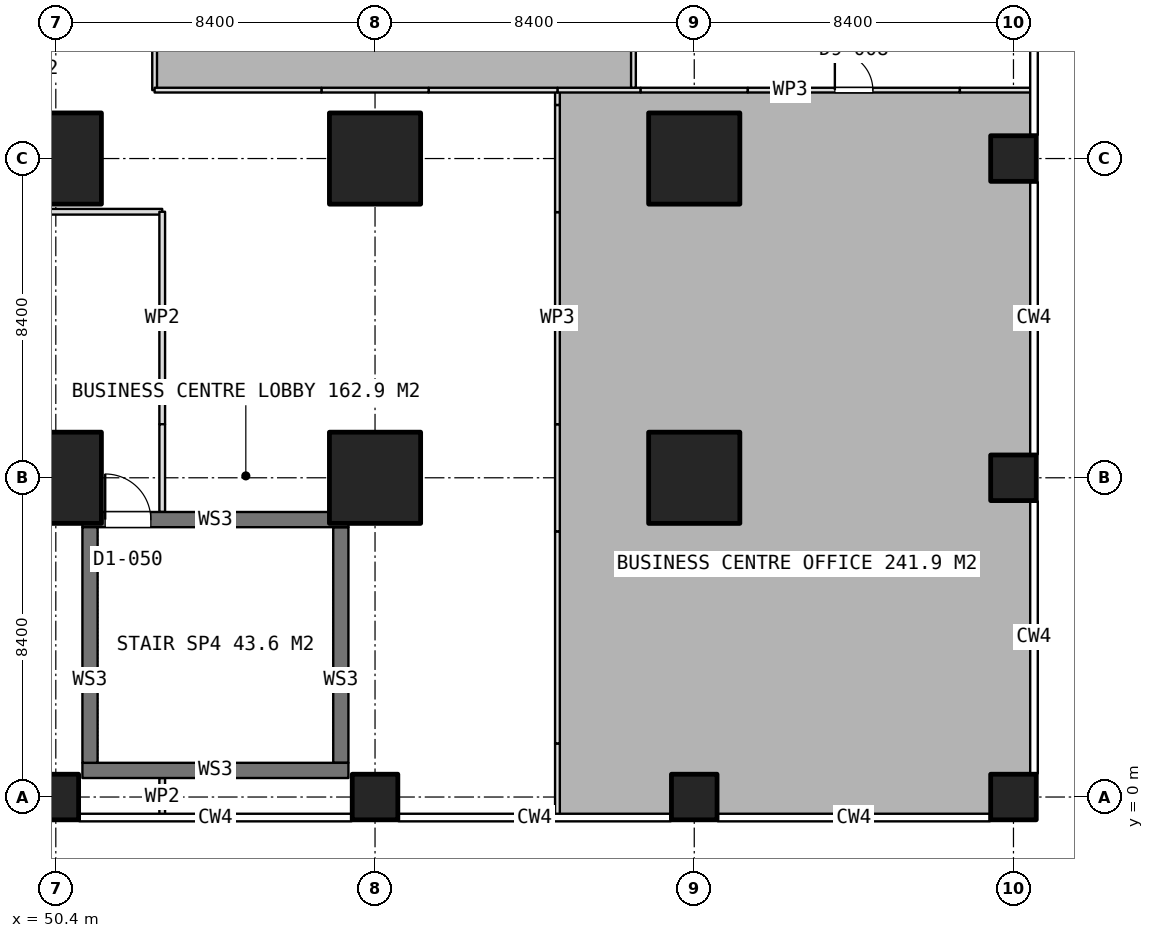
"""IFC4 building model, lengths in metres.
Left out: names, types, materials, properties, quantities, classifications, styles, units other than length and angle.
Written with IfcOpenShell. Run it as: python <this file> out.ifc"""

import sys

from ifc_helpers import new_model, si_unit, direction, frame, frame_2d, origin, origin_2d, place, context, subcontext, project, spatial, rectangle, extrude, element, fill, save


model = new_model("IFC4")
c1 = context("Model", 3, precision=1e-05, world=origin(), true_north=direction((0.0, 1.0)))
c2 = subcontext(c1, "Body", "Model", "MODEL_VIEW")
j1 = project(units=[si_unit("LENGTHUNIT", "METRE"), si_unit("PLANEANGLEUNIT", "RADIAN")], contexts=[c1])
p1 = place(None, origin())
s1 = spatial("IfcSite", under=j1, at=p1, CompositionType="ELEMENT")
p2 = place(p1, origin())
s2 = spatial("IfcBuilding", under=s1, at=p2, CompositionType="ELEMENT")
p3 = place(p2, frame((0.0, 0.0, 20.4)))
s3 = spatial("IfcBuildingStorey", under=s2, at=p3, CompositionType="ELEMENT", Elevation=20.4)
p4 = place(p3, frame((50.4, 0.0, 0.0), z_axis=(0.0, 0.0, 1.0), x_axis=(1.0, 0.0, 0.0)))
e1 = element("IfcColumn", 1, at=p4, inside=s3, PredefinedType="COLUMN", context=c2, shape_type="SweptSolid", body=[
    extrude(rectangle(XDim=1.2, YDim=1.2, at=origin_2d()), origin(), (0.0, 0.0, 1.0), 5.0),
])
for number, where, z_axis, x_axis in (
    (2, (50.4, 8.4, 0.0), (0.0, 0.0, 1.0), (1.0, 0.0, 0.0)),
    (3, (50.4, 16.8, 0.0), (0.0, 0.0, 1.0), (1.0, 0.0, 0.0)),
):
    element("IfcColumn", number, at=place(p3, frame(where, z_axis=z_axis, x_axis=x_axis)), inside=s3, PredefinedType="COLUMN", context=c2, shape_type="SweptSolid", body=[
        extrude(rectangle(XDim=2.4, YDim=2.4, at=origin_2d()), origin(), (0.0, 0.0, 1.0), 5.0),
    ])
p5 = place(p3, frame((58.8, 0.0, 0.0), z_axis=(0.0, 0.0, 1.0), x_axis=(1.0, 0.0, 0.0)))
e4 = element("IfcColumn", 4, at=p5, inside=s3, PredefinedType="COLUMN", context=c2, shape_type="SweptSolid", body=[
    extrude(rectangle(XDim=1.2, YDim=1.2, at=origin_2d()), origin(), (0.0, 0.0, 1.0), 5.0),
])
for number, where, z_axis, x_axis in (
    (5, (58.8, 8.4, 0.0), (0.0, 0.0, 1.0), (1.0, 0.0, 0.0)),
    (6, (58.8, 16.8, 0.0), (0.0, 0.0, 1.0), (1.0, 0.0, 0.0)),
):
    element("IfcColumn", number, at=place(p3, frame(where, z_axis=z_axis, x_axis=x_axis)), inside=s3, PredefinedType="COLUMN", context=c2, shape_type="SweptSolid", body=[
        extrude(rectangle(XDim=2.4, YDim=2.4, at=origin_2d()), origin(), (0.0, 0.0, 1.0), 5.0),
    ])
p6 = place(p3, frame((67.2, 0.0, 0.0), z_axis=(0.0, 0.0, 1.0), x_axis=(1.0, 0.0, 0.0)))
e7 = element("IfcColumn", 7, at=p6, inside=s3, PredefinedType="COLUMN", context=c2, shape_type="SweptSolid", body=[
    extrude(rectangle(XDim=1.2, YDim=1.2, at=origin_2d()), origin(), (0.0, 0.0, 1.0), 5.0),
])
for number, where, z_axis, x_axis in (
    (8, (67.2, 8.4, 0.0), (0.0, 0.0, 1.0), (1.0, 0.0, 0.0)),
    (9, (67.2, 16.8, 0.0), (0.0, 0.0, 1.0), (1.0, 0.0, 0.0)),
):
    element("IfcColumn", number, at=place(p3, frame(where, z_axis=z_axis, x_axis=x_axis)), inside=s3, PredefinedType="COLUMN", context=c2, shape_type="SweptSolid", body=[
        extrude(rectangle(XDim=2.4, YDim=2.4, at=origin_2d()), origin(), (0.0, 0.0, 1.0), 5.0),
    ])
for number, where, z_axis, x_axis in (
    (10, (75.6, 0.0, 0.0), (0.0, 0.0, 1.0), (1.0, 0.0, 0.0)),
    (11, (75.6, 8.4, 0.0), (0.0, 0.0, 1.0), (1.0, 0.0, 0.0)),
    (12, (75.6, 16.8, 0.0), (0.0, 0.0, 1.0), (1.0, 0.0, 0.0)),
):
    element("IfcColumn", number, at=place(p3, frame(where, z_axis=z_axis, x_axis=x_axis)), inside=s3, PredefinedType="COLUMN", context=c2, shape_type="SweptSolid", body=[
        extrude(rectangle(XDim=1.2, YDim=1.2, at=origin_2d()), origin(), (0.0, 0.0, 1.0), 5.0),
    ])
p7 = place(p3, frame((51.1, 0.7, 0.0), z_axis=(0.0, 0.0, 1.0), x_axis=(1.0, 0.0, 0.0)))
e13 = element("IfcWall", 13, at=p7, inside=s3, PredefinedType="SOLIDWALL", context=c2, shape_type="SweptSolid", body=[
    extrude(rectangle(XDim=7.0, YDim=0.4, at=frame_2d((3.5, 0.0))), origin(), (0.0, 0.0, 1.0), 2.8),
])
p8 = place(p3, frame((51.1, 7.3, 0.0), z_axis=(0.0, 0.0, 1.0), x_axis=(1.0, 0.0, 0.0)))
e14 = element("IfcWall", 14, at=p8, inside=s3, PredefinedType="SOLIDWALL", context=c2, shape_type="SweptSolid", body=[
    extrude(rectangle(XDim=7.0, YDim=0.4, at=frame_2d((3.5, 0.0))), origin(), (0.0, 0.0, 1.0), 2.8),
])
p9 = place(p8, frame((0.6, 0.0, 0.0)))
e15 = element("IfcOpeningElement", 15, at=p9, cuts=e14, PredefinedType="OPENING", context=c2, shape_type="SweptSolid", body=[
    extrude(rectangle(XDim=1.2, YDim=2.1, at=frame_2d((0.6, 1.05))), frame((0.0, 0.21, 0.0), z_axis=(0.0, -1.0, 0.0), x_axis=(1.0, 0.0, 0.0)), (0.0, 0.0, 1.0), 0.42),
])
for number, where, z_axis, x_axis in (
    (16, (51.3, 0.9, 0.0), (0.0, 0.0, 1.0), (0.0, 1.0, 0.0)),
    (17, (57.9, 0.9, 0.0), (0.0, 0.0, 1.0), (0.0, 1.0, 0.0)),
):
    element("IfcWall", number, at=place(p3, frame(where, z_axis=z_axis, x_axis=x_axis)), inside=s3, PredefinedType="SOLIDWALL", context=c2, shape_type="SweptSolid", body=[
        extrude(rectangle(XDim=6.2, YDim=0.4, at=frame_2d((3.1, 0.0))), origin(), (0.0, 0.0, 1.0), 2.8),
    ])
p10 = place(p3, frame((22.4, 15.4, 0.0), z_axis=(0.0, 0.0, 1.0), x_axis=(1.0, 0.0, 0.0)))
e18 = element("IfcWall", 18, at=p10, inside=s3, PredefinedType="PARTITIONING", context=c2, shape_type="SweptSolid", body=[
    extrude(rectangle(XDim=30.8, YDim=0.15, at=frame_2d((15.4, 0.0))), origin(), (0.0, 0.0, 1.0), 2.8),
])
p11 = place(p3, frame((53.2, 15.4, 0.0), z_axis=(0.0, 0.0, 1.0), x_axis=(0.0, -1.0, 0.0)))
e19 = element("IfcWall", 19, at=p11, inside=s3, PredefinedType="PARTITIONING", context=c2, shape_type="SweptSolid", body=[
    extrude(rectangle(XDim=5.59, YDim=0.15, at=frame_2d((2.795, 0.0))), origin(), (0.0, 0.0, 1.0), 2.8),
])
p12 = place(p3, frame((53.2, 9.81, 0.0), z_axis=(0.0, 0.0, 1.0), x_axis=(0.0, -1.0, 0.0)))
e20 = element("IfcWall", 20, at=p12, inside=s3, PredefinedType="PARTITIONING", context=c2, shape_type="SweptSolid", body=[
    extrude(rectangle(XDim=2.31, YDim=0.15, at=frame_2d((1.155, 0.0))), origin(), (0.0, 0.0, 1.0), 2.8),
])
p13 = place(p3, frame((53.2, 0.5, 0.0), z_axis=(0.0, 0.0, 1.0), x_axis=(0.0, -1.0, 0.0)))
e21 = element("IfcWall", 21, at=p13, inside=s3, PredefinedType="PARTITIONING", context=c2, shape_type="SweptSolid", body=[
    extrude(rectangle(XDim=0.99, YDim=0.15, at=frame_2d((0.495, 0.0))), origin(), (0.0, 0.0, 1.0), 2.8),
])
p14 = place(p3, frame((63.6, -0.49, 0.0), z_axis=(0.0, 0.0, 1.0), x_axis=(0.0, 1.0, 0.0)))
e22 = element("IfcWall", 22, at=p14, inside=s3, PredefinedType="PARTITIONING", context=c2, shape_type="SweptSolid", body=[
    extrude(rectangle(XDim=1.9, YDim=0.125, at=frame_2d((0.95, 0.0))), origin(), (0.0, 0.0, 1.0), 2.8),
])
p15 = place(p3, frame((63.6, 1.41, 0.0), z_axis=(0.0, 0.0, 1.0), x_axis=(0.0, 1.0, 0.0)))
e23 = element("IfcWall", 23, at=p15, inside=s3, PredefinedType="PARTITIONING", context=c2, shape_type="SweptSolid", body=[
    extrude(rectangle(XDim=5.58, YDim=0.125, at=frame_2d((2.79, 0.0))), origin(), (0.0, 0.0, 1.0), 4.6),
])
p16 = place(p3, frame((63.6, 6.99, 0.0), z_axis=(0.0, 0.0, 1.0), x_axis=(0.0, 1.0, 0.0)))
e24 = element("IfcWall", 24, at=p16, inside=s3, PredefinedType="PARTITIONING", context=c2, shape_type="SweptSolid", body=[
    extrude(rectangle(XDim=2.82, YDim=0.125, at=frame_2d((1.41, 0.0))), origin(), (0.0, 0.0, 1.0), 2.8),
])
p17 = place(p3, frame((63.6, 9.81, 0.0), z_axis=(0.0, 0.0, 1.0), x_axis=(0.0, 1.0, 0.0)))
e25 = element("IfcWall", 25, at=p17, inside=s3, PredefinedType="PARTITIONING", context=c2, shape_type="SweptSolid", body=[
    extrude(rectangle(XDim=5.58, YDim=0.125, at=frame_2d((2.79, 0.0))), origin(), (0.0, 0.0, 1.0), 4.6),
])
p18 = place(p3, frame((63.6, 15.39, 0.0), z_axis=(0.0, 0.0, 1.0), x_axis=(0.0, 1.0, 0.0)))
e26 = element("IfcWall", 26, at=p18, inside=s3, PredefinedType="PARTITIONING", context=c2, shape_type="SweptSolid", body=[
    extrude(rectangle(XDim=2.82, YDim=0.125, at=frame_2d((1.41, 0.0))), origin(), (0.0, 0.0, 1.0), 2.8),
])
p19 = place(p3, frame((63.6, 18.21, 0.0), z_axis=(0.0, 0.0, 1.0), x_axis=(0.0, 1.0, 0.0)))
e27 = element("IfcWall", 27, at=p19, inside=s3, PredefinedType="PARTITIONING", context=c2, shape_type="SweptSolid", body=[
    extrude(rectangle(XDim=0.39, YDim=0.125, at=frame_2d((0.195, 0.0))), origin(), (0.0, 0.0, 1.0), 4.6),
])
p20 = place(p3, frame((63.6, 18.6, 0.0), z_axis=(0.0, 0.0, 1.0), x_axis=(1.0, 0.0, 0.0)))
e28 = element("IfcWall", 28, at=p20, inside=s3, PredefinedType="PARTITIONING", context=c2, shape_type="SweptSolid", body=[
    extrude(rectangle(XDim=2.19, YDim=0.125, at=frame_2d((1.095, 0.0))), origin(), (0.0, 0.0, 1.0), 4.6),
])
p21 = place(p3, frame((65.79, 18.6, 0.0), z_axis=(0.0, 0.0, 1.0), x_axis=(1.0, 0.0, 0.0)))
e29 = element("IfcWall", 29, at=p21, inside=s3, PredefinedType="PARTITIONING", context=c2, shape_type="SweptSolid", body=[
    extrude(rectangle(XDim=2.82, YDim=0.125, at=frame_2d((1.41, 0.0))), origin(), (0.0, 0.0, 1.0), 2.8),
])
p22 = place(p3, frame((68.61, 18.6, 0.0), z_axis=(0.0, 0.0, 1.0), x_axis=(1.0, 0.0, 0.0)))
e30 = element("IfcWall", 30, at=p22, inside=s3, PredefinedType="PARTITIONING", context=c2, shape_type="SweptSolid", body=[
    extrude(rectangle(XDim=5.58, YDim=0.125, at=frame_2d((2.79, 0.0))), origin(), (0.0, 0.0, 1.0), 4.6),
])
p23 = place(p22, frame((2.29, 0.0, 0.0)))
e31 = element("IfcOpeningElement", 31, at=p23, cuts=e30, PredefinedType="OPENING", context=c2, shape_type="SweptSolid", body=[
    extrude(rectangle(XDim=1.0, YDim=2.1, at=frame_2d((0.5, 1.05))), frame((0.0, 0.073, 0.0), z_axis=(0.0, -1.0, 0.0), x_axis=(1.0, 0.0, 0.0)), (0.0, 0.0, 1.0), 0.145),
])
p24 = place(p3, frame((74.19, 18.6, 0.0), z_axis=(0.0, 0.0, 1.0), x_axis=(1.0, 0.0, 0.0)))
e32 = element("IfcWall", 32, at=p24, inside=s3, PredefinedType="PARTITIONING", context=c2, shape_type="SweptSolid", body=[
    extrude(rectangle(XDim=1.9, YDim=0.125, at=frame_2d((0.95, 0.0))), origin(), (0.0, 0.0, 1.0), 2.8),
])
p25 = place(p3, frame((53.0, 18.6, 0.0), z_axis=(0.0, 0.0, 1.0), x_axis=(0.0, 1.0, 0.0)))
e33 = element("IfcWall", 33, at=p25, inside=s3, PredefinedType="PARTITIONING", context=c2, shape_type="SweptSolid", body=[
    extrude(rectangle(XDim=9.8, YDim=0.125, at=frame_2d((4.9, 0.0))), origin(), (0.0, 0.0, 1.0), 4.6),
])
p26 = place(p3, frame((65.6, 23.79, 0.0), z_axis=(0.0, 0.0, 1.0), x_axis=(0.0, -1.0, 0.0)))
e34 = element("IfcWall", 34, at=p26, inside=s3, PredefinedType="PARTITIONING", context=c2, shape_type="SweptSolid", body=[
    extrude(rectangle(XDim=5.127, YDim=0.125, at=frame_2d((2.563, 0.0))), origin(), (0.0, 0.0, 1.0), 4.6),
])
p27 = place(p3, frame((63.6, 18.6, 0.0), z_axis=(0.0, 0.0, 1.0), x_axis=(-1.0, 0.0, 0.0)))
e35 = element("IfcWall", 35, at=p27, inside=s3, PredefinedType="PARTITIONING", context=c2, shape_type="SweptSolid", body=[
    extrude(rectangle(XDim=3.39, YDim=0.125, at=frame_2d((1.695, 0.0))), origin(), (0.0, 0.0, 1.0), 4.6),
])
p28 = place(p3, frame((60.21, 18.6, 0.0), z_axis=(0.0, 0.0, 1.0), x_axis=(-1.0, 0.0, 0.0)))
e36 = element("IfcWall", 36, at=p28, inside=s3, PredefinedType="PARTITIONING", context=c2, shape_type="SweptSolid", body=[
    extrude(rectangle(XDim=2.82, YDim=0.125, at=frame_2d((1.41, 0.0))), origin(), (0.0, 0.0, 1.0), 2.8),
])
p29 = place(p3, frame((57.39, 18.6, 0.0), z_axis=(0.0, 0.0, 1.0), x_axis=(-1.0, 0.0, 0.0)))
e37 = element("IfcWall", 37, at=p29, inside=s3, PredefinedType="PARTITIONING", context=c2, shape_type="SweptSolid", body=[
    extrude(rectangle(XDim=4.39, YDim=0.125, at=frame_2d((2.195, 0.0))), origin(), (0.0, 0.0, 1.0), 4.6),
])
p30 = place(p23, origin())
e38 = element("IfcDoor", 38, at=p30, inside=s3, OperationType="SINGLE_SWING_LEFT", PredefinedType="DOOR", context=c2, shape_type="SweptSolid", body=[
    extrude(rectangle(XDim=1.0, YDim=2.1, at=frame_2d((0.5, 1.05))), frame((0.0, 0.025, 0.0), z_axis=(0.0, -1.0, 0.0), x_axis=(1.0, 0.0, 0.0)), (0.0, 0.0, 1.0), 0.05),
])
fill(e31, e38)
p31 = place(p9, origin())
e39 = element("IfcDoor", 39, at=p31, inside=s3, OperationType="SINGLE_SWING_RIGHT", PredefinedType="DOOR", context=c2, shape_type="SweptSolid", body=[
    extrude(rectangle(XDim=1.2, YDim=2.1, at=frame_2d((0.6, 1.05))), frame((0.0, 0.025, 0.0), z_axis=(0.0, -1.0, 0.0), x_axis=(1.0, 0.0, 0.0)), (0.0, 0.0, 1.0), 0.05),
])
fill(e15, e39)
save(model, sys.argv[1])
